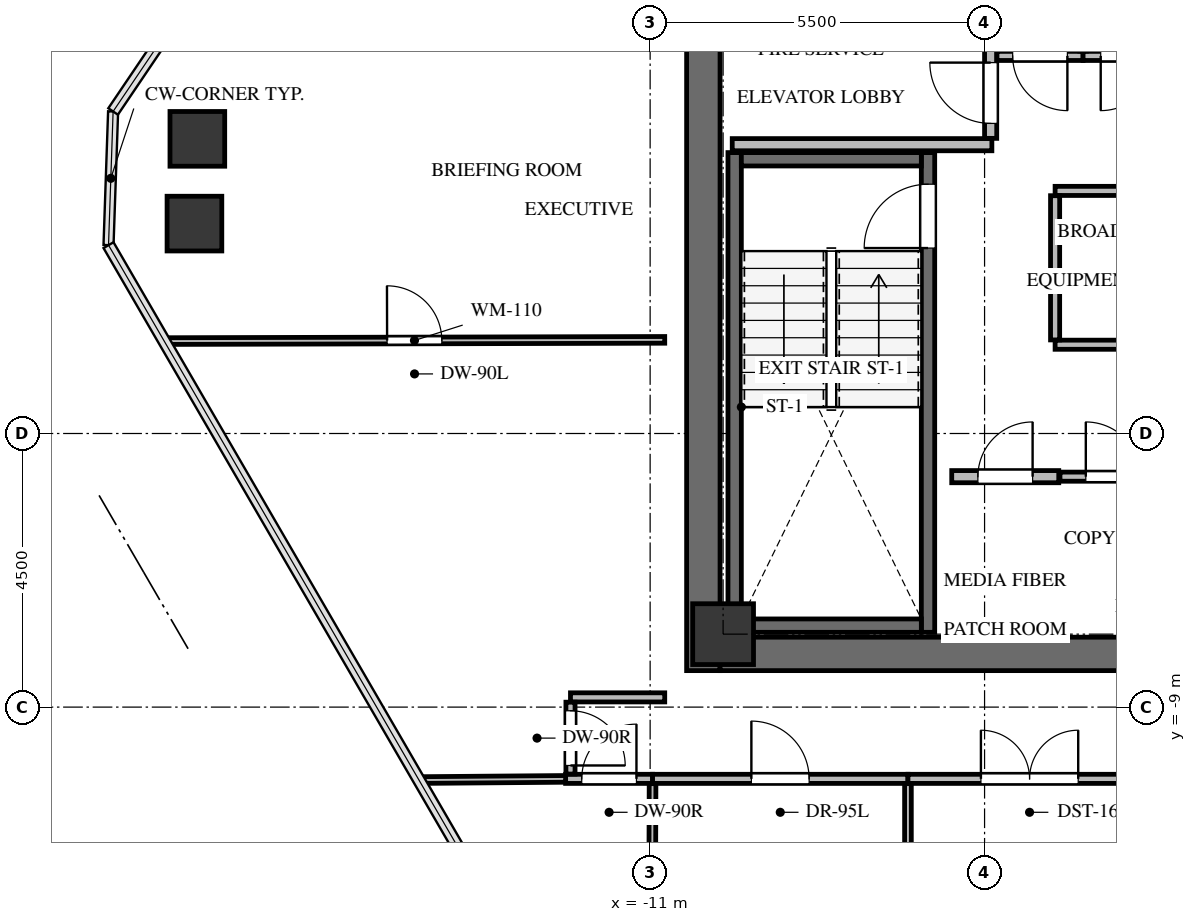
"""IFC4 building model, lengths in metres.
Left out: names, types, materials, properties, quantities, classifications, styles, units other than length and angle.
Written with IfcOpenShell. Run it as: python <this file> out.ifc"""

import sys

from ifc_helpers import new_model, si_unit, direction, frame, frame_2d, origin, origin_2d, place, context, subcontext, project, spatial, rectangle, extrude, source, transform, mapped, element, fill, save


model = new_model("IFC4")
c1 = context("Model", 3, precision=1e-05, world=origin(), true_north=direction((0.0, 1.0)))
c2 = subcontext(c1, "Body", "Model", "MODEL_VIEW")
j1 = project(units=[si_unit("LENGTHUNIT", "METRE"), si_unit("PLANEANGLEUNIT", "RADIAN")], contexts=[c1])
p1 = place(None, origin())
s1 = spatial("IfcSite", under=j1, at=p1, CompositionType="ELEMENT")
p2 = place(p1, origin())
s2 = spatial("IfcBuilding", under=s1, at=p2, CompositionType="ELEMENT")
p3 = place(p2, frame((0.0, 0.0, 248.0)))
s3 = spatial("IfcBuildingStorey", under=s2, at=p3, CompositionType="ELEMENT", Elevation=248.0)
p4 = place(p3, frame((-10.125, -8.4, 0.0), z_axis=(0.0, 0.0, 1.0), x_axis=(0.0, 1.0, 0.0)))
e1 = element("IfcWall", 1, at=p4, inside=s3, PredefinedType="SHEAR", context=c2, shape_type="SweptSolid", body=[
    extrude(rectangle(XDim=16.8, YDim=0.55, at=frame_2d((8.4, 0.0))), origin(), (0.0, 0.0, 1.0), 3.3),
])
p5 = place(p3, frame((-9.85, -8.125, 0.0), z_axis=(0.0, 0.0, 1.0), x_axis=(1.0, 0.0, 0.0)))
e2 = element("IfcWall", 2, at=p5, inside=s3, PredefinedType="SHEAR", context=c2, shape_type="SweptSolid", body=[
    extrude(rectangle(XDim=7.75, YDim=0.55, at=frame_2d((3.875, 0.0))), origin(), (0.0, 0.0, 1.0), 3.3),
])
p6 = place(p3, frame((-6.43, -7.77, -0.24), z_axis=(0.0, 0.0, 1.0), x_axis=(0.0, 1.0, 0.0)))
e3 = element("IfcWall", 3, at=p6, inside=s3, PredefinedType="SHEAR", context=c2, shape_type="SweptSolid", body=[
    extrude(rectangle(XDim=7.89, YDim=0.22, at=frame_2d((3.945, 0.0))), origin(), (0.0, 0.0, 1.0), 3.3),
])
p7 = place(p6, frame((6.32, 0.0, 0.0)))
e4 = element("IfcOpeningElement", 4, at=p7, cuts=e3, PredefinedType="OPENING", context=c2, shape_type="SweptSolid", body=[
    extrude(rectangle(XDim=1.05, YDim=2.15, at=frame_2d((0.525, 1.075))), frame((0.0, 0.12, 0.0), z_axis=(0.0, -1.0, 0.0), x_axis=(1.0, 0.0, 0.0)), (0.0, 0.0, 1.0), 0.24),
])
p8 = place(p3, frame((-9.61, 0.12, -0.24), z_axis=(0.0, 0.0, 1.0), x_axis=(0.0, -1.0, 0.0)))
e5 = element("IfcWall", 5, at=p8, inside=s3, PredefinedType="SHEAR", context=c2, shape_type="SweptSolid", body=[
    extrude(rectangle(XDim=7.89, YDim=0.22, at=frame_2d((3.945, 0.0))), origin(), (0.0, 0.0, 1.0), 3.3),
])
for number, where, z_axis, x_axis in (
    (6, (-9.5, -7.66, -0.24), (0.0, 0.0, 1.0), (1.0, 0.0, 0.0)),
    (7, (-6.54, 0.01, -0.24), (0.0, 0.0, 1.0), (-1.0, 0.0, 0.0)),
):
    element("IfcWall", number, at=place(p3, frame(where, z_axis=z_axis, x_axis=x_axis)), inside=s3, PredefinedType="SHEAR", context=c2, shape_type="SweptSolid", body=[
        extrude(rectangle(XDim=2.96, YDim=0.22, at=frame_2d((1.48, 0.0))), origin(), (0.0, 0.0, 1.0), 3.3),
    ])
m1 = source(origin(), c2, "Body", "SweptSolid", [
    extrude(rectangle(XDim=1.0, YDim=1.0, at=origin_2d()), origin(), (0.0, 0.0, 1.0), 3.3),
])
p9 = place(p3, frame((-9.8, -7.8, -0.24), z_axis=(0.0, 0.0, 1.0), x_axis=(1.0, 0.0, 0.0)))
e8 = element("IfcColumn", 8, at=p9, inside=s3, PredefinedType="COLUMN", context=c2, shape_type="MappedRepresentation", body=[
    mapped(m1, transform((0.0, 0.0, 0.0), x_axis=(1.0, 0.0, 0.0), y_axis=(0.0, 1.0, 0.0), z_axis=(0.0, 0.0, 1.0), scale=1.0)),
])
m2 = source(origin(), c2, "Body", "SweptSolid", [
    extrude(rectangle(XDim=0.9, YDim=0.9, at=origin_2d()), origin(), (0.0, 0.0, 1.0), 3.3),
])
for number, where, z_axis, x_axis in (
    (9, (-18.494, -1.048, -0.24), (0.0, 0.0, 1.0), (1.0, 0.0, 0.0)),
    (10, (-18.446, 0.346, -0.24), (0.0, 0.0, 1.0), (1.0, 0.0, 0.0)),
):
    element("IfcColumn", number, at=place(p3, frame(where, z_axis=z_axis, x_axis=x_axis)), inside=s3, PredefinedType="COLUMN", context=c2, shape_type="MappedRepresentation", body=[
        mapped(m2, transform((0.0, 0.0, 0.0), x_axis=(1.0, 0.0, 0.0), y_axis=(0.0, 1.0, 0.0), z_axis=(0.0, 0.0, 1.0), scale=1.0)),
    ])
p10 = place(p3, frame((-9.65, 0.25, 0.0), z_axis=(0.0, 0.0, 1.0), x_axis=(1.0, 0.0, 0.0)))
e11 = element("IfcWall", 11, at=p10, inside=s3, PredefinedType="SOLIDWALL", context=c2, shape_type="SweptSolid", body=[
    extrude(rectangle(XDim=4.27, YDim=0.2, at=frame_2d((2.135, 0.0))), origin(), (0.0, 0.0, 1.0), 3.045),
])
p11 = place(p3, frame((-5.4, 0.354, 0.0), z_axis=(0.0, 0.0, 1.0), x_axis=(0.0, 1.0, 0.0)))
e12 = element("IfcWall", 12, at=p11, inside=s3, PredefinedType="SOLIDWALL", context=c2, shape_type="SweptSolid", body=[
    extrude(rectangle(XDim=4.026, YDim=0.2, at=frame_2d((2.013, 0.0))), origin(), (0.0, 0.0, 1.0), 3.045),
])
p12 = place(p11, frame((0.246, 0.0, 0.0)))
e13 = element("IfcOpeningElement", 13, at=p12, cuts=e12, PredefinedType="OPENING", context=c2, shape_type="SweptSolid", body=[
    extrude(rectangle(XDim=1.0, YDim=2.15, at=frame_2d((0.5, 1.075))), frame((0.0, 0.11, 0.0), z_axis=(0.0, -1.0, 0.0), x_axis=(1.0, 0.0, 0.0)), (0.0, 0.0, 1.0), 0.22),
])
p13 = place(p3, frame((-6.04, -5.21, 0.0), z_axis=(0.0, 0.0, 1.0), x_axis=(1.0, 0.0, 0.0)))
e14 = element("IfcWall", 14, at=p13, inside=s3, PredefinedType="SOLIDWALL", context=c2, shape_type="SweptSolid", body=[
    extrude(rectangle(XDim=1.76, YDim=0.2, at=frame_2d((0.88, 0.0))), origin(), (0.0, 0.0, 1.0), 3.045),
])
p14 = place(p13, frame((0.43, 0.0, 0.0)))
e15 = element("IfcOpeningElement", 15, at=p14, cuts=e14, PredefinedType="OPENING", context=c2, shape_type="SweptSolid", body=[
    extrude(rectangle(XDim=0.9, YDim=2.05, at=frame_2d((0.45, 1.025))), frame((0.0, 0.11, 0.0), z_axis=(0.0, -1.0, 0.0), x_axis=(1.0, 0.0, 0.0)), (0.0, 0.0, 1.0), 0.22),
])
p15 = place(p3, frame((-4.26, -5.21, 0.0), z_axis=(0.0, 0.0, 1.0), x_axis=(1.0, 0.0, 0.0)))
e16 = element("IfcWall", 16, at=p15, inside=s3, PredefinedType="PARTITIONING", context=c2, shape_type="SweptSolid", body=[
    extrude(rectangle(XDim=1.75, YDim=0.15, at=frame_2d((0.875, 0.0))), origin(), (0.0, 0.0, 1.0), 3.045),
])
p16 = place(p15, frame((0.425, 0.0, 0.0)))
e17 = element("IfcOpeningElement", 17, at=p16, cuts=e16, PredefinedType="OPENING", context=c2, shape_type="SweptSolid", body=[
    extrude(rectangle(XDim=0.9, YDim=2.05, at=frame_2d((0.45, 1.025))), frame((0.0, 0.085, 0.0), z_axis=(0.0, -1.0, 0.0), x_axis=(1.0, 0.0, 0.0)), (0.0, 0.0, 1.0), 0.17),
])
p17 = place(p3, frame((1.19, -3.04, 0.0), z_axis=(0.0, 0.0, 1.0), x_axis=(-1.0, 0.0, 0.0)))
e18 = element("IfcWall", 18, at=p17, inside=s3, PredefinedType="PARTITIONING", context=c2, shape_type="SweptSolid", body=[
    extrude(rectangle(XDim=5.53, YDim=0.15, at=frame_2d((2.765, 0.0))), origin(), (0.0, 0.0, 1.0), 3.045),
])
p18 = place(p17, frame((2.315, 0.0, 0.0)))
e19 = element("IfcOpeningElement", 19, at=p18, cuts=e18, PredefinedType="OPENING", context=c2, shape_type="SweptSolid", body=[
    extrude(rectangle(XDim=0.9, YDim=2.05, at=frame_2d((0.45, 1.025))), frame((0.0, 0.085, 0.0), z_axis=(0.0, -1.0, 0.0), x_axis=(1.0, 0.0, 0.0)), (0.0, 0.0, 1.0), 0.17),
])
p19 = place(p3, frame((-4.34, -0.51, 0.0), z_axis=(0.0, 0.0, 1.0), x_axis=(1.0, 0.0, 0.0)))
e20 = element("IfcWall", 20, at=p19, inside=s3, PredefinedType="PARTITIONING", context=c2, shape_type="SweptSolid", body=[
    extrude(rectangle(XDim=5.53, YDim=0.15, at=frame_2d((2.765, 0.0))), origin(), (0.0, 0.0, 1.0), 3.045),
])
p20 = place(p3, frame((-4.34, -2.961, 0.0), z_axis=(0.0, 0.0, 1.0), x_axis=(0.0, 1.0, 0.0)))
e21 = element("IfcWall", 21, at=p20, inside=s3, PredefinedType="PARTITIONING", context=c2, shape_type="SweptSolid", body=[
    extrude(rectangle(XDim=2.372, YDim=0.15, at=frame_2d((1.186, 0.0))), origin(), (0.0, 0.0, 1.0), 3.045),
])
p21 = place(p3, frame((-3.88, 1.71, 0.0), z_axis=(0.0, 0.0, 1.0), x_axis=(-1.0, 0.0, 0.0)))
e22 = element("IfcWall", 22, at=p21, inside=s3, PredefinedType="PARTITIONING", context=c2, shape_type="SweptSolid", body=[
    extrude(rectangle(XDim=1.416, YDim=0.15, at=frame_2d((0.708, 0.0))), origin(), (0.0, 0.0, 1.0), 3.045),
])
p22 = place(p21, frame((0.258, 0.0, 0.0)))
e23 = element("IfcOpeningElement", 23, at=p22, cuts=e22, PredefinedType="OPENING", context=c2, shape_type="SweptSolid", body=[
    extrude(rectangle(XDim=0.9, YDim=2.05, at=frame_2d((0.45, 1.025))), frame((0.0, 0.085, 0.0), z_axis=(0.0, -1.0, 0.0), x_axis=(1.0, 0.0, 0.0)), (0.0, 0.0, 1.0), 0.17),
])
p23 = place(p3, frame((-2.4, 1.71, 0.0), z_axis=(0.0, 0.0, 1.0), x_axis=(-1.0, 0.0, 0.0)))
e24 = element("IfcWall", 24, at=p23, inside=s3, PredefinedType="PARTITIONING", context=c2, shape_type="SweptSolid", body=[
    extrude(rectangle(XDim=1.48, YDim=0.15, at=frame_2d((0.74, 0.0))), origin(), (0.0, 0.0, 1.0), 3.045),
])
p24 = place(p23, frame((0.29, 0.0, 0.0)))
e25 = element("IfcOpeningElement", 25, at=p24, cuts=e24, PredefinedType="OPENING", context=c2, shape_type="SweptSolid", body=[
    extrude(rectangle(XDim=0.9, YDim=2.05, at=frame_2d((0.45, 1.025))), frame((0.0, 0.085, 0.0), z_axis=(0.0, -1.0, 0.0), x_axis=(1.0, 0.0, 0.0)), (0.0, 0.0, 1.0), 0.17),
])
p25 = place(p3, frame((-12.39, -10.18, 0.0), z_axis=(0.0, 0.0, 1.0), x_axis=(1.0, 0.0, 0.0)))
e26 = element("IfcWall", 26, at=p25, inside=s3, PredefinedType="PARTITIONING", context=c2, shape_type="SweptSolid", body=[
    extrude(rectangle(XDim=1.43, YDim=0.15, at=frame_2d((0.715, 0.0))), origin(), (0.0, 0.0, 1.0), 3.045),
])
p26 = place(p25, frame((0.265, 0.0, 0.0)))
e27 = element("IfcOpeningElement", 27, at=p26, cuts=e26, PredefinedType="OPENING", context=c2, shape_type="SweptSolid", body=[
    extrude(rectangle(XDim=0.9, YDim=2.05, at=frame_2d((0.45, 1.025))), frame((0.0, 0.085, 0.0), z_axis=(0.0, -1.0, 0.0), x_axis=(1.0, 0.0, 0.0)), (0.0, 0.0, 1.0), 0.17),
])
p27 = place(p3, frame((-10.96, -10.18, 0.0), z_axis=(0.0, 0.0, 1.0), x_axis=(1.0, 0.0, 0.0)))
e28 = element("IfcWall", 28, at=p27, inside=s3, PredefinedType="PARTITIONING", context=c2, shape_type="SweptSolid", body=[
    extrude(rectangle(XDim=4.2, YDim=0.15, at=frame_2d((2.1, 0.0))), origin(), (0.0, 0.0, 1.0), 3.045),
])
p28 = place(p27, frame((1.625, 0.0, 0.0)))
e29 = element("IfcOpeningElement", 29, at=p28, cuts=e28, PredefinedType="OPENING", context=c2, shape_type="SweptSolid", body=[
    extrude(rectangle(XDim=0.95, YDim=2.1, at=frame_2d((0.475, 1.05))), frame((0.0, 0.085, 0.0), z_axis=(0.0, -1.0, 0.0), x_axis=(1.0, 0.0, 0.0)), (0.0, 0.0, 1.0), 0.17),
])
p29 = place(p3, frame((-6.76, -10.18, 0.0), z_axis=(0.0, 0.0, 1.0), x_axis=(1.0, 0.0, 0.0)))
e30 = element("IfcWall", 30, at=p29, inside=s3, PredefinedType="PARTITIONING", context=c2, shape_type="SweptSolid", body=[
    extrude(rectangle(XDim=4.0, YDim=0.15, at=frame_2d((2.0, 0.0))), origin(), (0.0, 0.0, 1.0), 2.301),
])
p30 = place(p29, frame((1.2, 0.0, 0.0)))
e31 = element("IfcOpeningElement", 31, at=p30, cuts=e30, PredefinedType="OPENING", context=c2, shape_type="SweptSolid", body=[
    extrude(rectangle(XDim=1.6, YDim=2.15, at=frame_2d((0.8, 1.075))), frame((0.0, 0.085, 0.0), z_axis=(0.0, -1.0, 0.0), x_axis=(1.0, 0.0, 0.0)), (0.0, 0.0, 1.0), 0.17),
])
p31 = place(p3, frame((-10.76, -8.84, 0.0), z_axis=(0.0, 0.0, 1.0), x_axis=(-1.0, 0.0, 0.0)))
e32 = element("IfcWall", 32, at=p31, inside=s3, PredefinedType="PARTITIONING", context=c2, shape_type="SweptSolid", body=[
    extrude(rectangle(XDim=1.55, YDim=0.15, at=frame_2d((0.775, 0.0))), origin(), (0.0, 0.0, 1.0), 3.045),
])
p32 = place(p3, frame((-12.31, -8.919, 0.0), z_axis=(0.0, 0.0, 1.0), x_axis=(0.0, -1.0, 0.0)))
e33 = element("IfcWall", 33, at=p32, inside=s3, PredefinedType="PARTITIONING", context=c2, shape_type="SweptSolid", body=[
    extrude(rectangle(XDim=1.182, YDim=0.15, at=frame_2d((0.591, 0.0))), origin(), (0.0, 0.0, 1.0), 3.045),
])
p33 = place(p32, frame((0.141, 0.0, 0.0)))
e34 = element("IfcOpeningElement", 34, at=p33, cuts=e33, PredefinedType="OPENING", context=c2, shape_type="SweptSolid", body=[
    extrude(rectangle(XDim=0.9, YDim=2.05, at=frame_2d((0.45, 1.025))), frame((0.0, 0.085, 0.0), z_axis=(0.0, -1.0, 0.0), x_axis=(1.0, 0.0, 0.0)), (0.0, 0.0, 1.0), 0.17),
])
p34 = place(p3, frame((-10.96, -10.259, 0.0), z_axis=(0.0, 0.0, 1.0), x_axis=(-0.003240981611, -0.999994748005, 0.0)))
e35 = element("IfcWall", 35, at=p34, inside=s3, PredefinedType="MOVABLE", context=c2, shape_type="SweptSolid", body=[
    extrude(rectangle(XDim=4.821, YDim=0.11, at=frame_2d((2.411, 0.0))), origin(), (0.0, 0.0, 1.0), 2.399),
])
p35 = place(p3, frame((-14.802, -10.2, 0.0), z_axis=(0.0, 0.0, 1.0), x_axis=(0.999968020968, 0.007997314604, 0.0)))
e36 = element("IfcWall", 36, at=p35, inside=s3, PredefinedType="MOVABLE", context=c2, shape_type="SweptSolid", body=[
    extrude(rectangle(XDim=2.412, YDim=0.11, at=frame_2d((1.206, 0.0))), origin(), (0.0, 0.0, 1.0), 2.399),
])
p36 = place(p3, frame((-6.76, -10.259, 0.0), z_axis=(0.0, 0.0, 1.0), x_axis=(0.0, -1.0, 0.0)))
e37 = element("IfcWall", 37, at=p36, inside=s3, PredefinedType="MOVABLE", context=c2, shape_type="SweptSolid", body=[
    extrude(rectangle(XDim=6.927, YDim=0.11, at=frame_2d((3.463, 0.0))), origin(), (0.0, 0.0, 1.0), 2.301),
])
p37 = place(p3, frame((-18.992, -2.98, 0.0), z_axis=(0.0, 0.0, 1.0), x_axis=(0.999997042683, 0.0024320004, 0.0)))
e38 = element("IfcWall", 38, at=p37, inside=s3, PredefinedType="MOVABLE", context=c2, shape_type="SweptSolid", body=[
    extrude(rectangle(XDim=8.232, YDim=0.11, at=frame_2d((4.116, 0.0))), origin(), (0.0, 0.0, 1.0), 2.399),
])
p38 = place(p37, frame((3.666, 0.0, 0.0)))
e39 = element("IfcOpeningElement", 39, at=p38, cuts=e38, PredefinedType="OPENING", context=c2, shape_type="SweptSolid", body=[
    extrude(rectangle(XDim=0.9, YDim=2.05, at=frame_2d((0.45, 1.025))), frame((0.0, 0.065, 0.0), z_axis=(0.0, -1.0, 0.0), x_axis=(1.0, 0.0, 0.0)), (0.0, 0.0, 1.0), 0.13),
])
m3 = source(origin(), c2, "Body", "SweptSolid", [
    extrude(rectangle(XDim=1.05, YDim=2.15, at=frame_2d((0.525, 1.075))), frame((0.0, 0.025, 0.0), z_axis=(0.0, -1.0, 0.0), x_axis=(1.0, 0.0, 0.0)), (0.0, 0.0, 1.0), 0.05),
])
p39 = place(p7, origin())
e40 = element("IfcDoor", 40, at=p39, inside=s3, OperationType="SINGLE_SWING_LEFT", PredefinedType="DOOR", context=c2, shape_type="MappedRepresentation", body=[
    mapped(m3, transform((0.0, 0.0, 0.0), x_axis=(1.0, 0.0, 0.0), y_axis=(0.0, 1.0, 0.0), z_axis=(0.0, 0.0, 1.0), scale=1.0)),
])
fill(e4, e40)
m4 = source(origin(), c2, "Body", "SweptSolid", [
    extrude(rectangle(XDim=1.0, YDim=2.15, at=frame_2d((0.5, 1.075))), frame((0.0, 0.025, 0.0), z_axis=(0.0, -1.0, 0.0), x_axis=(1.0, 0.0, 0.0)), (0.0, 0.0, 1.0), 0.05),
])
p40 = place(p12, origin())
e41 = element("IfcDoor", 41, at=p40, inside=s3, OperationType="SINGLE_SWING_RIGHT", PredefinedType="DOOR", context=c2, shape_type="MappedRepresentation", body=[
    mapped(m4, transform((0.0, 0.0, 0.0), x_axis=(1.0, 0.0, 0.0), y_axis=(0.0, 1.0, 0.0), z_axis=(0.0, 0.0, 1.0), scale=1.0)),
])
fill(e13, e41)
m5 = source(origin(), c2, "Body", "SweptSolid", [
    extrude(rectangle(XDim=0.9, YDim=2.05, at=frame_2d((0.45, 1.025))), frame((0.0, 0.025, 0.0), z_axis=(0.0, -1.0, 0.0), x_axis=(1.0, 0.0, 0.0)), (0.0, 0.0, 1.0), 0.05),
])
p41 = place(p14, origin())
e42 = element("IfcDoor", 42, at=p41, inside=s3, OperationType="SINGLE_SWING_RIGHT", PredefinedType="DOOR", context=c2, shape_type="MappedRepresentation", body=[
    mapped(m5, transform((0.0, 0.0, 0.0), x_axis=(1.0, 0.0, 0.0), y_axis=(0.0, 1.0, 0.0), z_axis=(0.0, 0.0, 1.0), scale=1.0)),
])
fill(e15, e42)
m6 = source(origin(), c2, "Body", "SweptSolid", [
    extrude(rectangle(XDim=0.9, YDim=2.05, at=frame_2d((0.45, 1.025))), frame((0.0, 0.025, 0.0), z_axis=(0.0, -1.0, 0.0), x_axis=(1.0, 0.0, 0.0)), (0.0, 0.0, 1.0), 0.05),
])
p42 = place(p16, origin())
e43 = element("IfcDoor", 43, at=p42, inside=s3, OperationType="SINGLE_SWING_LEFT", PredefinedType="DOOR", context=c2, shape_type="MappedRepresentation", body=[
    mapped(m6, transform((0.0, 0.0, 0.0), x_axis=(1.0, 0.0, 0.0), y_axis=(0.0, 1.0, 0.0), z_axis=(0.0, 0.0, 1.0), scale=1.0)),
])
fill(e17, e43)
p43 = place(p22, origin())
e44 = element("IfcDoor", 44, at=p43, inside=s3, OperationType="SINGLE_SWING_LEFT", PredefinedType="DOOR", context=c2, shape_type="MappedRepresentation", body=[
    mapped(m6, transform((0.0, 0.0, 0.0), x_axis=(1.0, 0.0, 0.0), y_axis=(0.0, 1.0, 0.0), z_axis=(0.0, 0.0, 1.0), scale=1.0)),
])
fill(e23, e44)
p44 = place(p24, origin())
e45 = element("IfcDoor", 45, at=p44, inside=s3, OperationType="SINGLE_SWING_RIGHT", PredefinedType="DOOR", context=c2, shape_type="MappedRepresentation", body=[
    mapped(m5, transform((0.0, 0.0, 0.0), x_axis=(1.0, 0.0, 0.0), y_axis=(0.0, 1.0, 0.0), z_axis=(0.0, 0.0, 1.0), scale=1.0)),
])
fill(e25, e45)
m7 = source(origin(), c2, "Body", "SweptSolid", [
    extrude(rectangle(XDim=0.9, YDim=2.05, at=frame_2d((0.45, 1.025))), frame((0.0, 0.025, 0.0), z_axis=(0.0, -1.0, 0.0), x_axis=(1.0, 0.0, 0.0)), (0.0, 0.0, 1.0), 0.05),
])
p45 = place(p26, origin())
e46 = element("IfcDoor", 46, at=p45, inside=s3, OperationType="SINGLE_SWING_RIGHT", PredefinedType="DOOR", context=c2, shape_type="MappedRepresentation", body=[
    mapped(m7, transform((0.0, 0.0, 0.0), x_axis=(1.0, 0.0, 0.0), y_axis=(0.0, 1.0, 0.0), z_axis=(0.0, 0.0, 1.0), scale=1.0)),
])
fill(e27, e46)
m8 = source(origin(), c2, "Body", "SweptSolid", [
    extrude(rectangle(XDim=0.95, YDim=2.1, at=frame_2d((0.475, 1.05))), frame((0.0, 0.025, 0.0), z_axis=(0.0, -1.0, 0.0), x_axis=(1.0, 0.0, 0.0)), (0.0, 0.0, 1.0), 0.05),
])
p46 = place(p28, origin())
e47 = element("IfcDoor", 47, at=p46, inside=s3, OperationType="SINGLE_SWING_LEFT", PredefinedType="DOOR", context=c2, shape_type="MappedRepresentation", body=[
    mapped(m8, transform((0.0, 0.0, 0.0), x_axis=(1.0, 0.0, 0.0), y_axis=(0.0, 1.0, 0.0), z_axis=(0.0, 0.0, 1.0), scale=1.0)),
])
fill(e29, e47)
m9 = source(origin(), c2, "Body", "SweptSolid", [
    extrude(rectangle(XDim=1.6, YDim=2.15, at=frame_2d((0.8, 1.075))), frame((0.0, 0.025, 0.0), z_axis=(0.0, -1.0, 0.0), x_axis=(1.0, 0.0, 0.0)), (0.0, 0.0, 1.0), 0.05),
])
p47 = place(p30, origin())
e48 = element("IfcDoor", 48, at=p47, inside=s3, OperationType="DOUBLE_DOOR_SINGLE_SWING", PredefinedType="DOOR", context=c2, shape_type="MappedRepresentation", body=[
    mapped(m9, transform((0.0, 0.0, 0.0), x_axis=(1.0, 0.0, 0.0), y_axis=(0.0, 1.0, 0.0), z_axis=(0.0, 0.0, 1.0), scale=1.0)),
])
fill(e31, e48)
p48 = place(p33, origin())
e49 = element("IfcDoor", 49, at=p48, inside=s3, OperationType="SINGLE_SWING_RIGHT", PredefinedType="DOOR", context=c2, shape_type="MappedRepresentation", body=[
    mapped(m7, transform((0.0, 0.0, 0.0), x_axis=(1.0, 0.0, 0.0), y_axis=(0.0, 1.0, 0.0), z_axis=(0.0, 0.0, 1.0), scale=1.0)),
])
fill(e34, e49)
m10 = source(origin(), c2, "Body", "SweptSolid", [
    extrude(rectangle(XDim=0.9, YDim=2.05, at=frame_2d((0.45, 1.025))), frame((0.0, 0.025, 0.0), z_axis=(0.0, -1.0, 0.0), x_axis=(1.0, 0.0, 0.0)), (0.0, 0.0, 1.0), 0.05),
])
p49 = place(p38, origin())
e50 = element("IfcDoor", 50, at=p49, inside=s3, OperationType="SINGLE_SWING_LEFT", PredefinedType="DOOR", context=c2, shape_type="MappedRepresentation", body=[
    mapped(m10, transform((0.0, 0.0, 0.0), x_axis=(1.0, 0.0, 0.0), y_axis=(0.0, 1.0, 0.0), z_axis=(0.0, 0.0, 1.0), scale=1.0)),
])
fill(e39, e50)
save(model, sys.argv[1])
